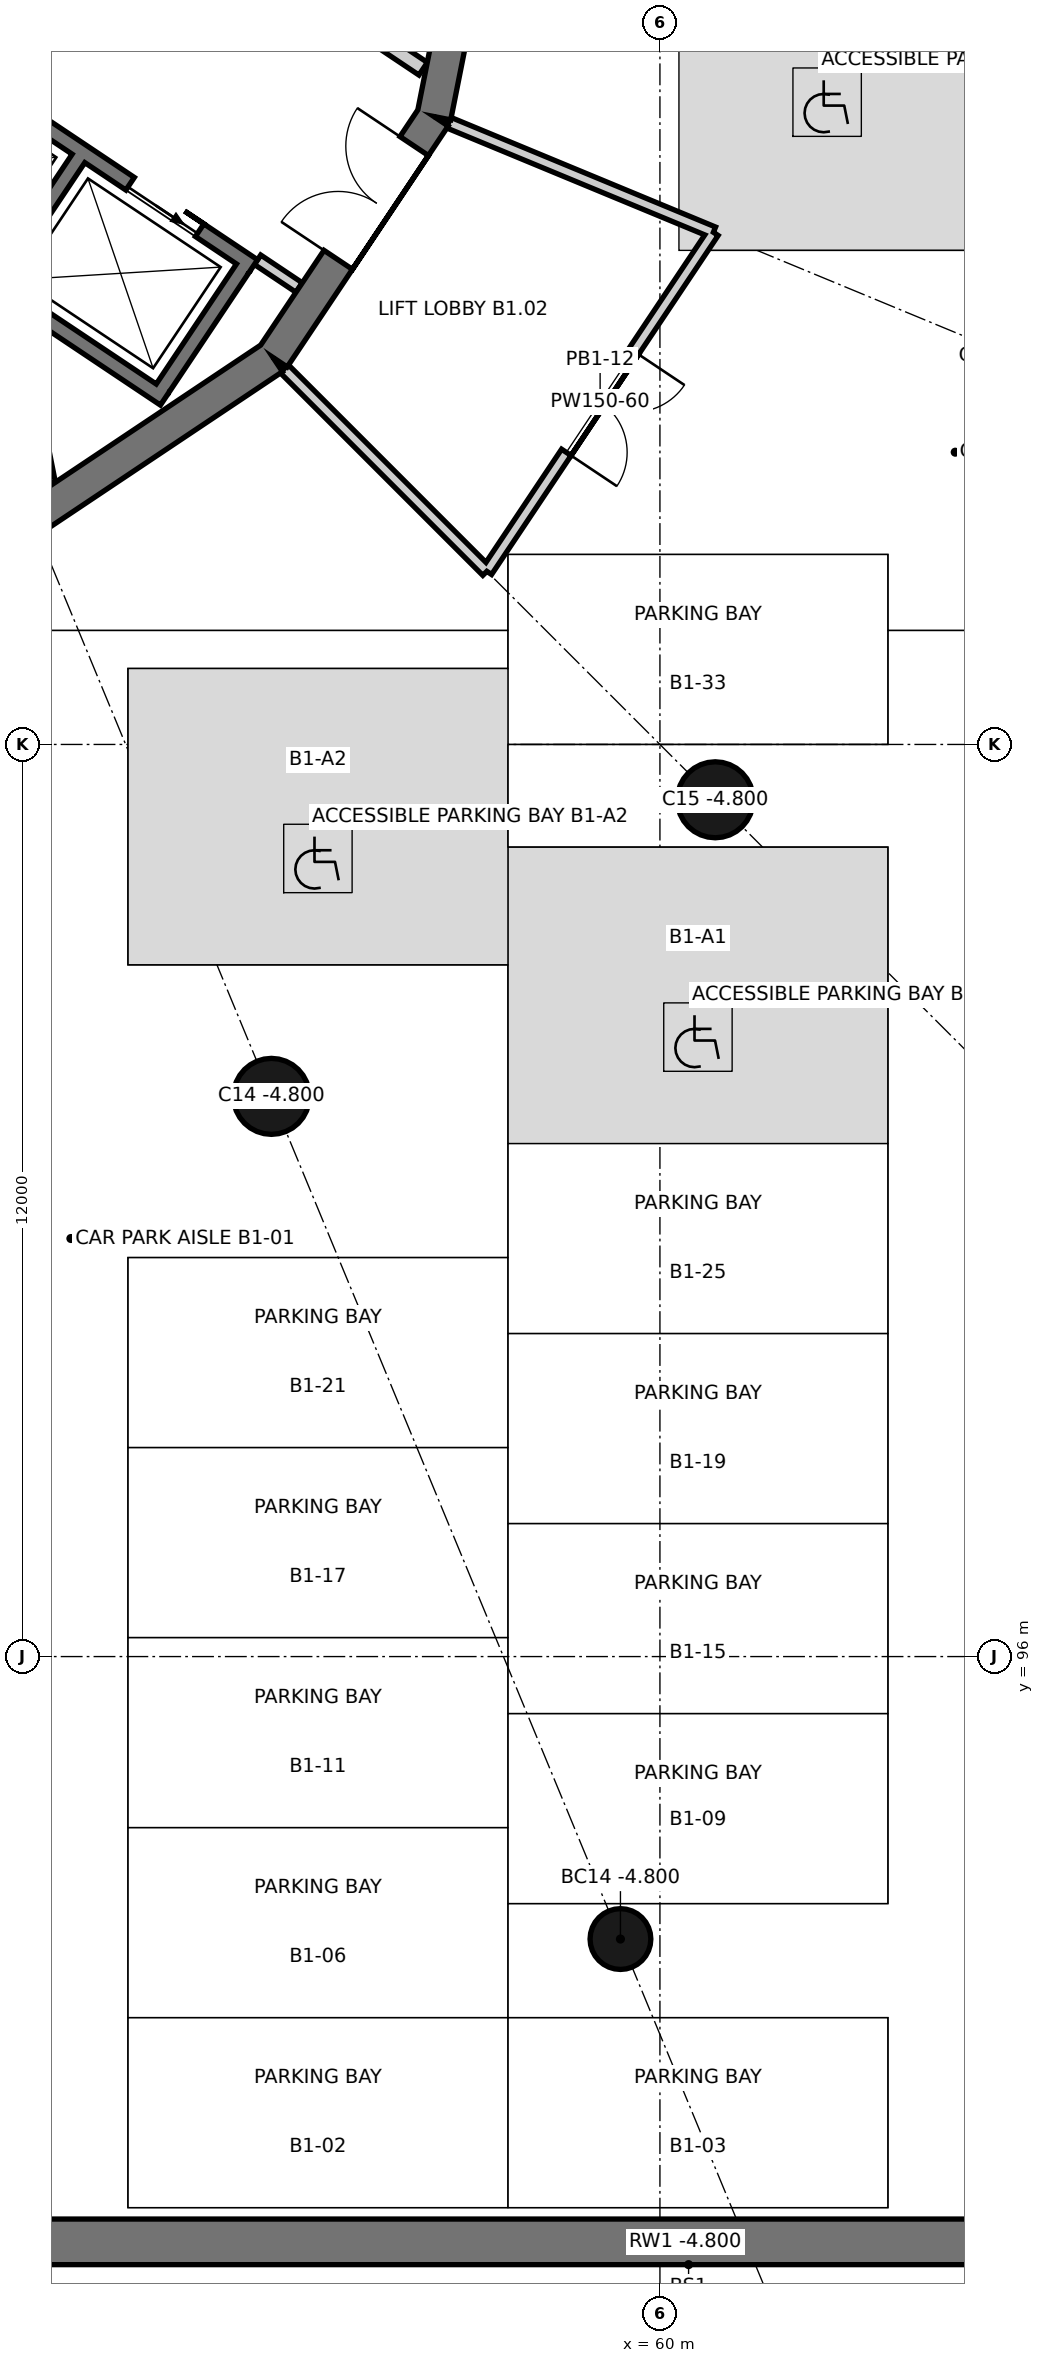
"""IFC4 building model, lengths in metres.
Left out: names, types, materials, properties, quantities, classifications, styles, units other than length and angle.
Written with IfcOpenShell. Run it as: python <this file> out.ifc"""

import sys

from ifc_helpers import new_model, si_unit, direction, frame, frame_2d, origin, origin_2d, place, context, subcontext, project, spatial, polyline, rectangle, circle, outline, extrude, element, fill, save


model = new_model("IFC4")
c1 = context("Model", 3, precision=1e-05, world=origin(), true_north=direction((0.0, 1.0)))
c2 = subcontext(c1, "Body", "Model", "MODEL_VIEW")
j1 = project(units=[si_unit("LENGTHUNIT", "METRE"), si_unit("PLANEANGLEUNIT", "RADIAN")], contexts=[c1])
p1 = place(None, origin())
s1 = spatial("IfcSite", under=j1, at=p1, CompositionType="ELEMENT")
p2 = place(p1, origin())
s2 = spatial("IfcBuilding", under=s1, at=p2, CompositionType="ELEMENT")
p3 = place(p2, frame((0.0, 0.0, -4.2)))
s3 = spatial("IfcBuildingStorey", under=s2, at=p3, CompositionType="ELEMENT", Elevation=-4.2)
p4 = place(p3, frame((51.739, 110.973, -0.6), z_axis=(0.0, 0.0, 1.0), x_axis=(0.83148829117, 0.555542277102, 0.0)))
e1 = element("IfcWall", 1, at=p4, inside=s3, PredefinedType="SHEAR", context=c2, shape_type="SweptSolid", body=[
    extrude(outline(polyline([(-0.045, -0.225), (3.857, -0.225), (3.768, 0.225), (0.045, 0.225), (-0.045, -0.225)])), origin(), (0.0, 0.0, 1.0), 4.8),
])
p5 = place(p3, frame((54.909, 113.091, -0.6), z_axis=(0.0, 0.0, 1.0), x_axis=(0.555542277102, 0.83148829117, 0.0)))
e2 = element("IfcWall", 2, at=p5, inside=s3, PredefinedType="SHEAR", context=c2, shape_type="SweptSolid", body=[
    extrude(outline(polyline([(-0.045, -0.225), (3.857, -0.225), (3.768, 0.225), (0.045, 0.225), (-0.045, -0.225)])), origin(), (0.0, 0.0, 1.0), 4.8),
])
p6 = place(p5, frame((1.545, 0.0, 0.6)))
e3 = element("IfcOpeningElement", 3, at=p6, cuts=e2, PredefinedType="OPENING", context=c2, shape_type="SweptSolid", body=[
    extrude(rectangle(XDim=1.8, YDim=2.1, at=frame_2d((0.9, 1.05))), frame((0.0, 0.235, 0.0), z_axis=(0.0, -1.0, 0.0), x_axis=(1.0, 0.0, 0.0)), (0.0, 0.0, 1.0), 0.47),
])
p7 = place(p3, frame((57.027, 116.261, -0.6), z_axis=(0.0, 0.0, 1.0), x_axis=(0.195069197673, 0.98078948206, 0.0)))
e4 = element("IfcWall", 4, at=p7, inside=s3, PredefinedType="SHEAR", context=c2, shape_type="SweptSolid", body=[
    extrude(outline(polyline([(-0.045, -0.225), (3.857, -0.225), (3.768, 0.225), (0.045, 0.225), (-0.045, -0.225)])), origin(), (0.0, 0.0, 1.0), 4.8),
])
p8 = place(p7, frame((1.895, 0.0, 0.6)))
e5 = element("IfcOpeningElement", 5, at=p8, cuts=e4, PredefinedType="OPENING", context=c2, shape_type="SweptSolid", body=[
    extrude(rectangle(XDim=0.9, YDim=2.1, at=frame_2d((0.45, 1.05))), frame((0.0, 0.235, 0.0), z_axis=(0.0, -1.0, 0.0), x_axis=(1.0, 0.0, 0.0)), (0.0, 0.0, 1.0), 0.47),
])
p9 = place(p3, frame((50.16, 117.293, -0.6), z_axis=(0.0, 0.0, 1.0), x_axis=(0.831479497601, -0.55555543834, 0.0)))
e6 = element("IfcWall", 6, at=p9, inside=s3, PredefinedType="SHEAR", context=c2, shape_type="SweptSolid", body=[
    extrude(rectangle(XDim=5.4, YDim=0.2, at=frame_2d((2.7, 0.0))), origin(), (0.0, 0.0, 1.0), 4.8),
])
p10 = place(p9, frame((0.85, 0.0, 0.6)))
e7 = element("IfcOpeningElement", 7, at=p10, cuts=e6, PredefinedType="OPENING", context=c2, shape_type="SweptSolid", body=[
    extrude(rectangle(XDim=1.1, YDim=2.1, at=frame_2d((0.55, 1.05))), frame((0.0, 0.11, 0.0), z_axis=(0.0, -1.0, 0.0), x_axis=(1.0, 0.0, 0.0)), (0.0, 0.0, 1.0), 0.22),
])
p11 = place(p9, frame((3.45, 0.0, 0.6)))
e8 = element("IfcOpeningElement", 8, at=p11, cuts=e6, PredefinedType="OPENING", context=c2, shape_type="SweptSolid", body=[
    extrude(rectangle(XDim=1.1, YDim=2.1, at=frame_2d((0.55, 1.05))), frame((0.0, 0.11, 0.0), z_axis=(0.0, -1.0, 0.0), x_axis=(1.0, 0.0, 0.0)), (0.0, 0.0, 1.0), 0.22),
])
p12 = place(p3, frame((48.994, 115.548, -0.6), z_axis=(0.0, 0.0, 1.0), x_axis=(0.831444656906, -0.555607579593, 0.0)))
e9 = element("IfcWall", 9, at=p12, inside=s3, PredefinedType="SHEAR", context=c2, shape_type="SweptSolid", body=[
    extrude(rectangle(XDim=5.4, YDim=0.2, at=frame_2d((2.7, 0.0))), origin(), (0.0, 0.0, 1.0), 4.8),
])
p13 = place(p3, frame((52.35, 115.71, -0.6), z_axis=(0.0, 0.0, 1.0), x_axis=(-0.55550058618, -0.831516144614, 0.0)))
e10 = element("IfcWall", 10, at=p13, inside=s3, PredefinedType="SHEAR", context=c2, shape_type="SweptSolid", body=[
    extrude(rectangle(XDim=1.9, YDim=0.2, at=frame_2d((0.95, 0.0))), origin(), (0.0, 0.0, 1.0), 4.8),
])
p14 = place(p3, frame((54.512, 114.266, -0.6), z_axis=(0.0, 0.0, 1.0), x_axis=(-0.555589423235, -0.83145678949, 0.0)))
e11 = element("IfcWall", 11, at=p14, inside=s3, PredefinedType="SHEAR", context=c2, shape_type="SweptSolid", body=[
    extrude(rectangle(XDim=1.9, YDim=0.2, at=frame_2d((0.95, 0.0))), origin(), (0.0, 0.0, 1.0), 4.8),
])
for number, where, z_axis, x_axis in (
    (12, (54.888, 103.37, -0.6), (0.0, 0.0, 1.0), (1.0, 0.0, 0.0)),
    (13, (60.728, 107.272, -0.6), (0.0, 0.0, 1.0), (1.0, 0.0, 0.0)),
):
    element("IfcColumn", number, at=place(p3, frame(where, z_axis=z_axis, x_axis=x_axis)), inside=s3, PredefinedType="COLUMN", context=c2, shape_type="SweptSolid", body=[
        extrude(circle(Radius=0.5, at=origin_2d()), origin(), (0.0, 0.0, 1.0), 4.8),
    ])
p15 = place(p3, frame((59.48, 92.284, -0.6), z_axis=(0.0, 0.0, 1.0), x_axis=(1.0, 0.0, 0.0)))
e14 = element("IfcColumn", 14, at=p15, inside=s3, PredefinedType="COLUMN", context=c2, shape_type="SweptSolid", body=[
    extrude(circle(Radius=0.4, at=origin_2d()), origin(), (0.0, 0.0, 1.0), 4.35),
])
p16 = place(p3, frame((32.9, 88.3, -0.6), z_axis=(0.0, 0.0, 1.0), x_axis=(1.0, 0.0, 0.0)))
e15 = element("IfcWall", 15, at=p16, inside=s3, PredefinedType="SOLIDWALL", context=c2, shape_type="SweptSolid", body=[
    extrude(outline(polyline([(0.0, -0.3), (41.354, -0.3), (41.172, 0.3), (0.0, 0.3), (0.0, -0.3)])), origin(), (0.0, 0.0, 1.0), 4.8),
])
p17 = place(p3, frame((56.885, 116.89, 0.0), z_axis=(0.0, 0.0, 1.0), x_axis=(-0.831446094913, 0.555605427667, 0.0)))
e16 = element("IfcWall", 16, at=p17, inside=s3, PredefinedType="SOLIDWALL", context=c2, shape_type="SweptSolid", body=[
    extrude(rectangle(XDim=2.115, YDim=0.2, at=frame_2d((1.058, 0.0))), origin(), (0.0, 0.0, 1.0), 3.85),
])
p18 = place(p3, frame((51.502, 113.67, 0.0), z_axis=(0.0, 0.0, 1.0), x_axis=(0.19508928515, -0.980785486648, 0.0)))
e17 = element("IfcWall", 17, at=p18, inside=s3, PredefinedType="SOLIDWALL", context=c2, shape_type="SweptSolid", body=[
    extrude(rectangle(XDim=2.286, YDim=0.2, at=frame_2d((1.143, 0.0))), origin(), (0.0, 0.0, 1.0), 3.85),
])
p19 = place(p3, frame((54.706, 114.377, 0.0), z_axis=(0.0, 0.0, 1.0), x_axis=(0.831421626399, -0.555642042286, 0.0)))
e18 = element("IfcWall", 18, at=p19, inside=s3, PredefinedType="PARTITIONING", context=c2, shape_type="SweptSolid", body=[
    extrude(rectangle(XDim=0.658, YDim=0.15, at=frame_2d((0.329, 0.0))), origin(), (0.0, 0.0, 1.0), 3.85),
])
p20 = place(p3, frame((57.22, 116.181, 0.0), z_axis=(0.0, 0.0, 1.0), x_axis=(0.923870028546, -0.382706376162, 0.0)))
e19 = element("IfcWall", 19, at=p20, inside=s3, PredefinedType="PARTITIONING", context=c2, shape_type="SweptSolid", body=[
    extrude(rectangle(XDim=3.77, YDim=0.15, at=frame_2d((1.885, 0.0))), origin(), (0.0, 0.0, 1.0), 3.05),
])
p21 = place(p3, frame((60.703, 114.738, 0.0), z_axis=(0.0, 0.0, 1.0), x_axis=(-0.555592510383, -0.831454726612, 0.0)))
e20 = element("IfcWall", 20, at=p21, inside=s3, PredefinedType="PARTITIONING", context=c2, shape_type="SweptSolid", body=[
    extrude(rectangle(XDim=5.365, YDim=0.15, at=frame_2d((2.683, 0.0))), origin(), (0.0, 0.0, 1.0), 3.85),
])
p22 = place(p21, frame((1.882, 0.0, 0.0)))
e21 = element("IfcOpeningElement", 21, at=p22, cuts=e20, PredefinedType="OPENING", context=c2, shape_type="SweptSolid", body=[
    extrude(rectangle(XDim=1.6, YDim=2.1, at=frame_2d((0.8, 1.05))), frame((0.0, 0.085, 0.0), z_axis=(0.0, -1.0, 0.0), x_axis=(1.0, 0.0, 0.0)), (0.0, 0.0, 1.0), 0.17),
])
p23 = place(p3, frame((57.723, 110.277, 0.0), z_axis=(0.0, 0.0, 1.0), x_axis=(-0.707106781187, 0.707106781187, 0.0)))
e22 = element("IfcWall", 22, at=p23, inside=s3, PredefinedType="PARTITIONING", context=c2, shape_type="SweptSolid", body=[
    extrude(rectangle(XDim=3.77, YDim=0.15, at=frame_2d((1.885, 0.0))), origin(), (0.0, 0.0, 1.0), 3.05),
])
p24 = place(p11, origin())
e23 = element("IfcDoor", 23, at=p24, inside=s3, OperationType="SLIDING_TO_LEFT", PredefinedType="DOOR", context=c2, shape_type="SweptSolid", body=[
    extrude(rectangle(XDim=1.1, YDim=2.1, at=frame_2d((0.55, 1.05))), frame((0.0, 0.025, 0.0), z_axis=(0.0, -1.0, 0.0), x_axis=(1.0, 0.0, 0.0)), (0.0, 0.0, 1.0), 0.05),
])
fill(e8, e23)
p25 = place(p6, origin())
e24 = element("IfcDoor", 24, at=p25, inside=s3, OperationType="DOUBLE_DOOR_SINGLE_SWING", PredefinedType="DOOR", context=c2, shape_type="SweptSolid", body=[
    extrude(rectangle(XDim=1.8, YDim=2.1, at=frame_2d((0.9, 1.05))), frame((0.0, 0.025, 0.0), z_axis=(0.0, -1.0, 0.0), x_axis=(1.0, 0.0, 0.0)), (0.0, 0.0, 1.0), 0.05),
])
fill(e3, e24)
p26 = place(p22, origin())
e25 = element("IfcDoor", 25, at=p26, inside=s3, OperationType="DOUBLE_DOOR_SINGLE_SWING", PredefinedType="DOOR", context=c2, shape_type="SweptSolid", body=[
    extrude(rectangle(XDim=1.6, YDim=2.1, at=frame_2d((0.8, 1.05))), frame((0.0, 0.025, 0.0), z_axis=(0.0, -1.0, 0.0), x_axis=(1.0, 0.0, 0.0)), (0.0, 0.0, 1.0), 0.05),
])
fill(e21, e25)
save(model, sys.argv[1])
